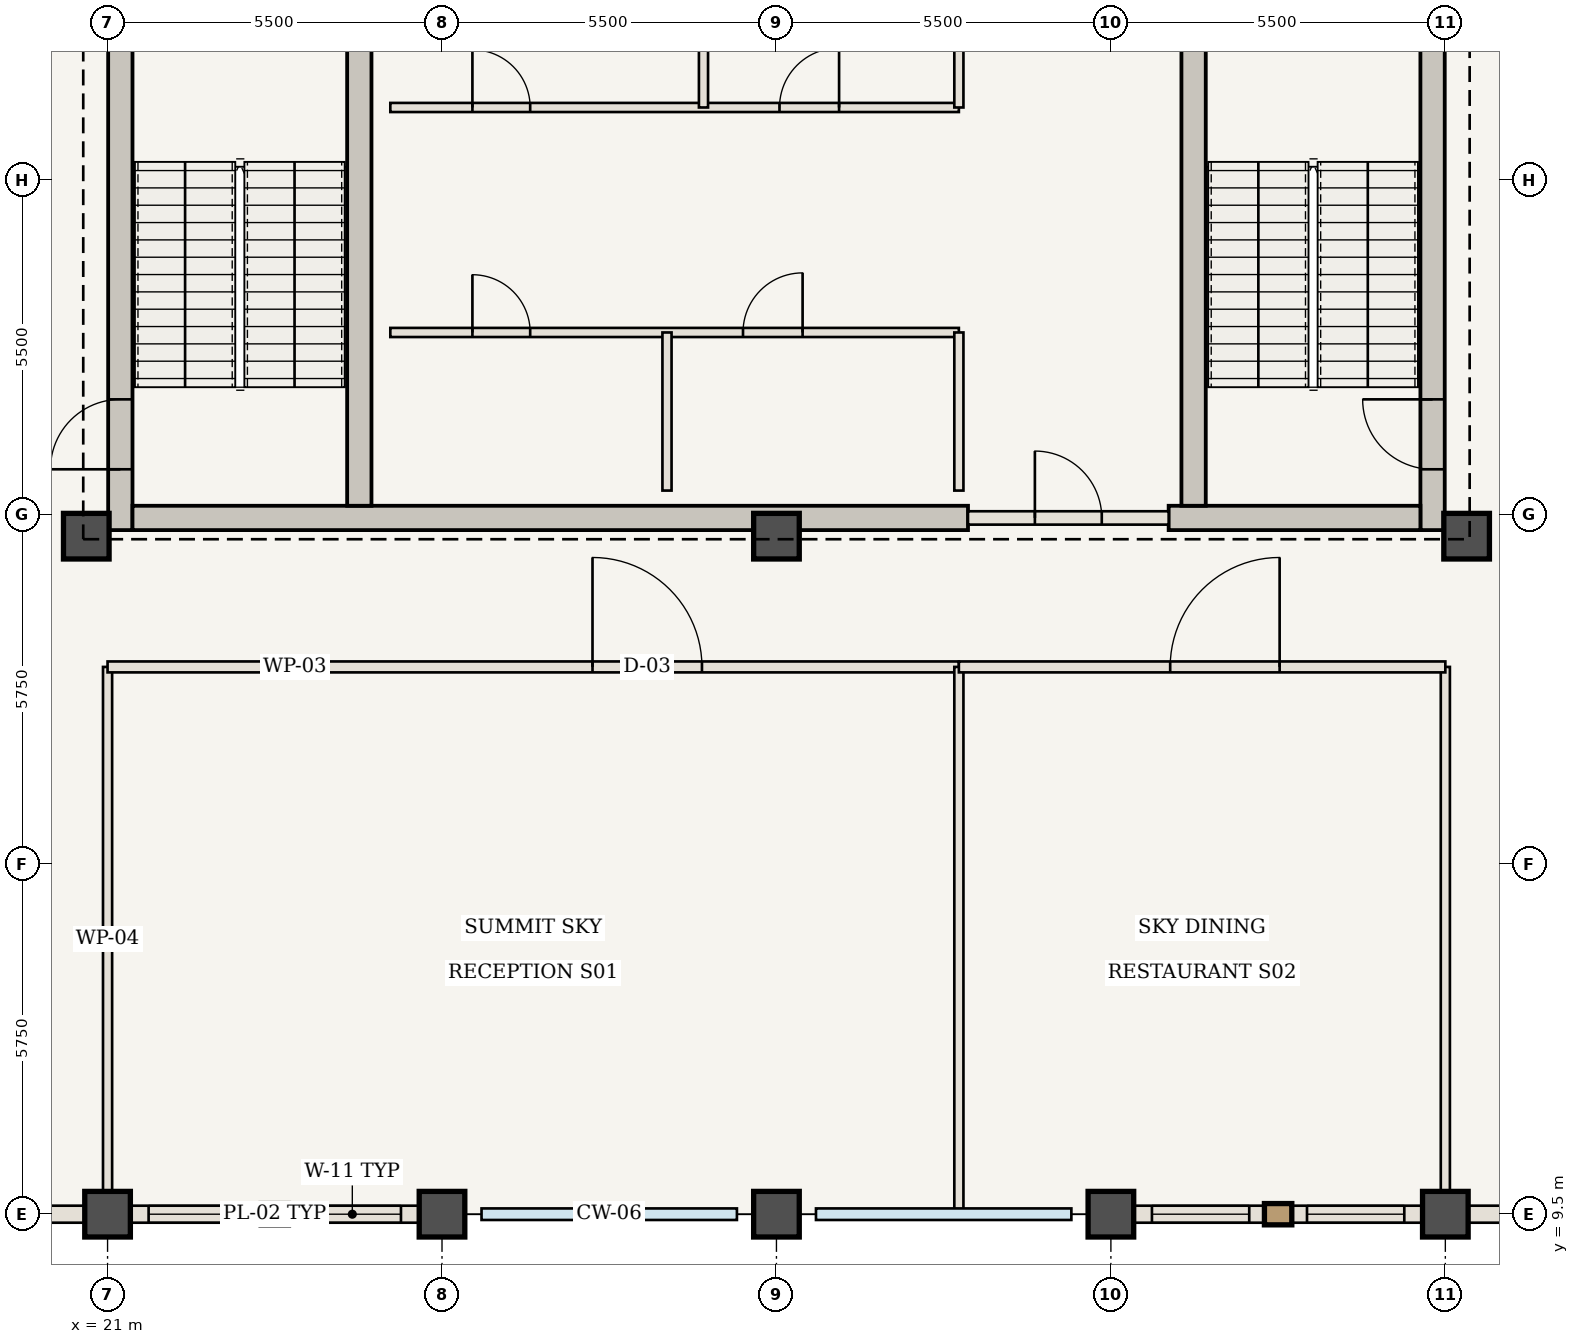
"""IFC4 building model, lengths in metres.
Left out: names, types, materials, properties, quantities, classifications, styles, units other than length and angle.
Written with IfcOpenShell. Run it as: python <this file> out.ifc"""

import sys

from ifc_helpers import new_model, si_unit, direction, frame, frame_2d, origin, origin_2d, place, context, subcontext, project, spatial, rectangle, extrude, element, fill, save


model = new_model("IFC4")
c1 = context("Model", 3, precision=1e-05, world=origin(), true_north=direction((0.0, 1.0)))
c2 = subcontext(c1, "Body", "Model", "MODEL_VIEW")
j1 = project(units=[si_unit("LENGTHUNIT", "METRE"), si_unit("PLANEANGLEUNIT", "RADIAN")], contexts=[c1])
p1 = place(None, origin())
s1 = spatial("IfcSite", under=j1, at=p1, CompositionType="ELEMENT")
p2 = place(p1, origin())
s2 = spatial("IfcBuilding", under=s1, at=p2, CompositionType="ELEMENT")
p3 = place(p2, frame((0.0, 0.0, 308.35)))
s3 = spatial("IfcBuildingStorey", under=s2, at=p3, CompositionType="ELEMENT", Elevation=308.35)
p4 = place(p3, frame((21.21, 20.75, 0.0), z_axis=(0.0, 0.0, 1.0), x_axis=(0.0, 1.0, 0.0)))
e1 = element("IfcWall", 1, at=p4, inside=s3, PredefinedType="SHEAR", context=c2, shape_type="SweptSolid", body=[
    extrude(rectangle(XDim=9.85, YDim=0.4, at=frame_2d((4.925, 0.0))), origin(), (0.0, 0.0, 1.0), 4.9),
])
p5 = place(p4, frame((1.0, 0.0, 0.0)))
e2 = element("IfcOpeningElement", 2, at=p5, cuts=e1, PredefinedType="OPENING", context=c2, shape_type="SweptSolid", body=[
    extrude(rectangle(XDim=1.15, YDim=2.15, at=frame_2d((0.575, 1.075))), frame((0.0, 0.21, 0.0), z_axis=(0.0, -1.0, 0.0), x_axis=(1.0, 0.0, 0.0)), (0.0, 0.0, 1.0), 0.42),
])
p6 = place(p3, frame((42.79, 20.75, 0.0), z_axis=(0.0, 0.0, 1.0), x_axis=(0.0, 1.0, 0.0)))
e3 = element("IfcWall", 3, at=p6, inside=s3, PredefinedType="SHEAR", context=c2, shape_type="SweptSolid", body=[
    extrude(rectangle(XDim=9.85, YDim=0.4, at=frame_2d((4.925, 0.0))), origin(), (0.0, 0.0, 1.0), 4.9),
])
p7 = place(p6, frame((1.0, 0.0, 0.0)))
e4 = element("IfcOpeningElement", 4, at=p7, cuts=e3, PredefinedType="OPENING", context=c2, shape_type="SweptSolid", body=[
    extrude(rectangle(XDim=1.15, YDim=2.15, at=frame_2d((0.575, 1.075))), frame((0.0, 0.21, 0.0), z_axis=(0.0, -1.0, 0.0), x_axis=(1.0, 0.0, 0.0)), (0.0, 0.0, 1.0), 0.42),
])
p8 = place(p3, frame((21.41, 20.95, 0.0), z_axis=(0.0, 0.0, 1.0), x_axis=(1.0, 0.0, 0.0)))
e5 = element("IfcWall", 5, at=p8, inside=s3, PredefinedType="SHEAR", context=c2, shape_type="SweptSolid", body=[
    extrude(rectangle(XDim=13.74, YDim=0.4, at=frame_2d((6.87, 0.0))), origin(), (0.0, 0.0, 1.0), 4.9),
])
p9 = place(p3, frame((38.45, 20.95, 0.0), z_axis=(0.0, 0.0, 1.0), x_axis=(1.0, 0.0, 0.0)))
e6 = element("IfcWall", 6, at=p9, inside=s3, PredefinedType="SHEAR", context=c2, shape_type="SweptSolid", body=[
    extrude(rectangle(XDim=4.14, YDim=0.4, at=frame_2d((2.07, 0.0))), origin(), (0.0, 0.0, 1.0), 4.9),
])
for number, where, z_axis, x_axis in (
    (7, (25.14, 21.15, 0.0), (0.0, 0.0, 1.0), (0.0, 1.0, 0.0)),
    (8, (38.86, 21.15, 0.0), (0.0, 0.0, 1.0), (0.0, 1.0, 0.0)),
):
    element("IfcWall", number, at=place(p3, frame(where, z_axis=z_axis, x_axis=x_axis)), inside=s3, PredefinedType="SHEAR", context=c2, shape_type="SweptSolid", body=[
        extrude(rectangle(XDim=9.45, YDim=0.4, at=frame_2d((4.725, 0.0))), origin(), (0.0, 0.0, 1.0), 4.9),
    ])
for number, where, z_axis, x_axis in (
    (9, (20.65, 20.65, 0.0), (0.0, 0.0, 1.0), (1.0, 0.0, 0.0)),
    (10, (32.0, 20.65, 0.0), (0.0, 0.0, 1.0), (1.0, 0.0, 0.0)),
    (11, (43.35, 20.65, 0.0), (0.0, 0.0, 1.0), (1.0, 0.0, 0.0)),
    (12, (21.0, 9.5, 0.0), (0.0, 0.0, 1.0), (1.0, 0.0, 0.0)),
    (13, (26.5, 9.5, 0.0), (0.0, 0.0, 1.0), (1.0, 0.0, 0.0)),
    (14, (32.0, 9.5, 0.0), (0.0, 0.0, 1.0), (1.0, 0.0, 0.0)),
    (15, (37.5, 9.5, 0.0), (0.0, 0.0, 1.0), (1.0, 0.0, 0.0)),
    (16, (43.0, 9.5, 0.0), (0.0, 0.0, 1.0), (1.0, 0.0, 0.0)),
):
    element("IfcColumn", number, at=place(p3, frame(where, z_axis=z_axis, x_axis=x_axis)), inside=s3, PredefinedType="COLUMN", context=c2, shape_type="SweptSolid", body=[
        extrude(rectangle(XDim=0.75, YDim=0.75, at=origin_2d()), origin(), (0.0, 0.0, 1.0), 4.9),
    ])
p10 = place(p3, frame((35.15, 20.95, 0.0), z_axis=(0.0, 0.0, 1.0), x_axis=(1.0, 0.0, 0.0)))
e17 = element("IfcWall", 17, at=p10, inside=s3, PredefinedType="STANDARD", context=c2, shape_type="SweptSolid", body=[
    extrude(rectangle(XDim=3.3, YDim=0.22, at=frame_2d((1.65, 0.0))), origin(), (0.0, 0.0, 1.0), 4.64),
])
p11 = place(p10, frame((1.1, 0.0, 0.0)))
e18 = element("IfcOpeningElement", 18, at=p11, cuts=e17, PredefinedType="OPENING", context=c2, shape_type="SweptSolid", body=[
    extrude(rectangle(XDim=1.1, YDim=2.15, at=frame_2d((0.55, 1.075))), frame((0.0, 0.12, 0.0), z_axis=(0.0, -1.0, 0.0), x_axis=(1.0, 0.0, 0.0)), (0.0, 0.0, 1.0), 0.24),
])
p12 = place(p3, frame((25.65, 24.0, 0.0), z_axis=(0.0, 0.0, 1.0), x_axis=(1.0, 0.0, 0.0)))
e19 = element("IfcWall", 19, at=p12, inside=s3, PredefinedType="STANDARD", context=c2, shape_type="SweptSolid", body=[
    extrude(rectangle(XDim=9.35, YDim=0.15, at=frame_2d((4.675, 0.0))), origin(), (0.0, 0.0, 1.0), 4.64),
])
p13 = place(p12, frame((1.35, 0.0, 0.0)))
e20 = element("IfcOpeningElement", 20, at=p13, cuts=e19, PredefinedType="OPENING", context=c2, shape_type="SweptSolid", body=[
    extrude(rectangle(XDim=0.95, YDim=2.15, at=frame_2d((0.475, 1.075))), frame((0.0, 0.085, 0.0), z_axis=(0.0, -1.0, 0.0), x_axis=(1.0, 0.0, 0.0)), (0.0, 0.0, 1.0), 0.17),
])
p14 = place(p12, frame((5.8, 0.0, 0.0)))
e21 = element("IfcOpeningElement", 21, at=p14, cuts=e19, PredefinedType="OPENING", context=c2, shape_type="SweptSolid", body=[
    extrude(rectangle(XDim=0.98, YDim=2.2, at=frame_2d((0.49, 1.1))), frame((0.0, 0.085, 0.0), z_axis=(0.0, -1.0, 0.0), x_axis=(1.0, 0.0, 0.0)), (0.0, 0.0, 1.0), 0.17),
])
for number, where, z_axis, x_axis in (
    (22, (30.2, 21.4, 0.0), (0.0, 0.0, 1.0), (0.0, 1.0, 0.0)),
    (23, (35.0, 21.4, 0.0), (0.0, 0.0, 1.0), (0.0, 1.0, 0.0)),
):
    element("IfcWall", number, at=place(p3, frame(where, z_axis=z_axis, x_axis=x_axis)), inside=s3, PredefinedType="STANDARD", context=c2, shape_type="SweptSolid", body=[
        extrude(rectangle(XDim=2.6, YDim=0.15, at=frame_2d((1.3, 0.0))), origin(), (0.0, 0.0, 1.0), 4.64),
    ])
p15 = place(p3, frame((25.65, 27.7, 0.0), z_axis=(0.0, 0.0, 1.0), x_axis=(1.0, 0.0, 0.0)))
e24 = element("IfcWall", 24, at=p15, inside=s3, PredefinedType="STANDARD", context=c2, shape_type="SweptSolid", body=[
    extrude(rectangle(XDim=9.35, YDim=0.15, at=frame_2d((4.675, 0.0))), origin(), (0.0, 0.0, 1.0), 4.64),
])
p16 = place(p15, frame((1.35, 0.0, 0.0)))
e25 = element("IfcOpeningElement", 25, at=p16, cuts=e24, PredefinedType="OPENING", context=c2, shape_type="SweptSolid", body=[
    extrude(rectangle(XDim=0.95, YDim=2.15, at=frame_2d((0.475, 1.075))), frame((0.0, 0.085, 0.0), z_axis=(0.0, -1.0, 0.0), x_axis=(1.0, 0.0, 0.0)), (0.0, 0.0, 1.0), 0.17),
])
p17 = place(p15, frame((6.4, 0.0, 0.0)))
e26 = element("IfcOpeningElement", 26, at=p17, cuts=e24, PredefinedType="OPENING", context=c2, shape_type="SweptSolid", body=[
    extrude(rectangle(XDim=0.98, YDim=2.2, at=frame_2d((0.49, 1.1))), frame((0.0, 0.085, 0.0), z_axis=(0.0, -1.0, 0.0), x_axis=(1.0, 0.0, 0.0)), (0.0, 0.0, 1.0), 0.17),
])
for number, where, z_axis, x_axis in (
    (27, (30.8, 27.7, 0.0), (0.0, 0.0, 1.0), (0.0, 1.0, 0.0)),
    (28, (35.0, 27.7, 0.0), (0.0, 0.0, 1.0), (0.0, 1.0, 0.0)),
):
    element("IfcWall", number, at=place(p3, frame(where, z_axis=z_axis, x_axis=x_axis)), inside=s3, PredefinedType="STANDARD", context=c2, shape_type="SweptSolid", body=[
        extrude(rectangle(XDim=2.75, YDim=0.15, at=frame_2d((1.375, 0.0))), origin(), (0.0, 0.0, 1.0), 4.64),
    ])
for number, where, z_axis, x_axis in (
    (29, (21.0, 9.56, 0.0), (0.0, 0.0, 1.0), (0.0, 1.0, 0.0)),
    (30, (43.0, 9.56, 0.0), (0.0, 0.0, 1.0), (0.0, 1.0, 0.0)),
):
    element("IfcWall", number, at=place(p3, frame(where, z_axis=z_axis, x_axis=x_axis)), inside=s3, PredefinedType="STANDARD", context=c2, shape_type="SweptSolid", body=[
        extrude(rectangle(XDim=8.94, YDim=0.15, at=frame_2d((4.47, 0.0))), origin(), (0.0, 0.0, 1.0), 4.64),
    ])
p18 = place(p3, frame((21.0, 18.5, 0.0), z_axis=(0.0, 0.0, 1.0), x_axis=(1.0, 0.0, 0.0)))
e31 = element("IfcWall", 31, at=p18, inside=s3, PredefinedType="STANDARD", context=c2, shape_type="SweptSolid", body=[
    extrude(rectangle(XDim=14.0, YDim=0.18, at=frame_2d((7.0, 0.0))), origin(), (0.0, 0.0, 1.0), 4.64),
])
p19 = place(p18, frame((7.975, 0.0, 0.0)))
e32 = element("IfcOpeningElement", 32, at=p19, cuts=e31, PredefinedType="OPENING", context=c2, shape_type="SweptSolid", body=[
    extrude(rectangle(XDim=1.8, YDim=2.35, at=frame_2d((0.9, 1.175))), frame((0.0, 0.1, 0.0), z_axis=(0.0, -1.0, 0.0), x_axis=(1.0, 0.0, 0.0)), (0.0, 0.0, 1.0), 0.2),
])
p20 = place(p3, frame((35.0, 9.56, 0.0), z_axis=(0.0, 0.0, 1.0), x_axis=(0.0, 1.0, 0.0)))
e33 = element("IfcWall", 33, at=p20, inside=s3, PredefinedType="STANDARD", context=c2, shape_type="SweptSolid", body=[
    extrude(rectangle(XDim=8.94, YDim=0.15, at=frame_2d((4.47, 0.0))), origin(), (0.0, 0.0, 1.0), 4.64),
])
p21 = place(p3, frame((35.0, 18.5, 0.0), z_axis=(0.0, 0.0, 1.0), x_axis=(1.0, 0.0, 0.0)))
e34 = element("IfcWall", 34, at=p21, inside=s3, PredefinedType="STANDARD", context=c2, shape_type="SweptSolid", body=[
    extrude(rectangle(XDim=8.0, YDim=0.18, at=frame_2d((4.0, 0.0))), origin(), (0.0, 0.0, 1.0), 4.64),
])
p22 = place(p21, frame((3.475, 0.0, 0.0)))
e35 = element("IfcOpeningElement", 35, at=p22, cuts=e34, PredefinedType="OPENING", context=c2, shape_type="SweptSolid", body=[
    extrude(rectangle(XDim=1.8, YDim=2.35, at=frame_2d((0.9, 1.175))), frame((0.0, 0.1, 0.0), z_axis=(0.0, -1.0, 0.0), x_axis=(1.0, 0.0, 0.0)), (0.0, 0.0, 1.0), 0.2),
])
p23 = place(p3, frame((21.0, 9.5, 0.0), z_axis=(0.0, 0.0, 1.0), x_axis=(-1.0, 0.0, 0.0)))
e36 = element("IfcWall", 36, at=p23, inside=s3, PredefinedType="USERDEFINED", context=c2, shape_type="SweptSolid", body=[
    extrude(rectangle(XDim=5.5, YDim=0.28, at=frame_2d((2.75, 0.0))), origin(), (0.0, 0.0, 1.0), 3.94),
])
p24 = place(p3, frame((26.5, 9.5, 0.0), z_axis=(0.0, 0.0, 1.0), x_axis=(-1.0, 0.0, 0.0)))
e37 = element("IfcWall", 37, at=p24, inside=s3, PredefinedType="USERDEFINED", context=c2, shape_type="SweptSolid", body=[
    extrude(rectangle(XDim=5.5, YDim=0.28, at=frame_2d((2.75, 0.0))), origin(), (0.0, 0.0, 1.0), 3.94),
])
p25 = place(p24, frame((0.675, 0.0, 0.85)))
e38 = element("IfcOpeningElement", 38, at=p25, cuts=e37, PredefinedType="OPENING", context=c2, shape_type="SweptSolid", body=[
    extrude(rectangle(XDim=1.6, YDim=2.15, at=frame_2d((0.8, 1.075))), frame((0.0, 0.15, 0.0), z_axis=(0.0, -1.0, 0.0), x_axis=(1.0, 0.0, 0.0)), (0.0, 0.0, 1.0), 0.3),
])
p26 = place(p24, frame((3.225, 0.0, 0.85)))
e39 = element("IfcOpeningElement", 39, at=p26, cuts=e37, PredefinedType="OPENING", context=c2, shape_type="SweptSolid", body=[
    extrude(rectangle(XDim=1.6, YDim=2.15, at=frame_2d((0.8, 1.075))), frame((0.0, 0.15, 0.0), z_axis=(0.0, -1.0, 0.0), x_axis=(1.0, 0.0, 0.0)), (0.0, 0.0, 1.0), 0.3),
])
p27 = place(p3, frame((43.0, 9.5, 0.0), z_axis=(0.0, 0.0, 1.0), x_axis=(-1.0, 0.0, 0.0)))
e40 = element("IfcWall", 40, at=p27, inside=s3, PredefinedType="USERDEFINED", context=c2, shape_type="SweptSolid", body=[
    extrude(rectangle(XDim=5.5, YDim=0.28, at=frame_2d((2.75, 0.0))), origin(), (0.0, 0.0, 1.0), 3.94),
])
p28 = place(p27, frame((0.675, 0.0, 0.85)))
e41 = element("IfcOpeningElement", 41, at=p28, cuts=e40, PredefinedType="OPENING", context=c2, shape_type="SweptSolid", body=[
    extrude(rectangle(XDim=1.6, YDim=2.15, at=frame_2d((0.8, 1.075))), frame((0.0, 0.15, 0.0), z_axis=(0.0, -1.0, 0.0), x_axis=(1.0, 0.0, 0.0)), (0.0, 0.0, 1.0), 0.3),
])
p29 = place(p27, frame((3.225, 0.0, 0.85)))
e42 = element("IfcOpeningElement", 42, at=p29, cuts=e40, PredefinedType="OPENING", context=c2, shape_type="SweptSolid", body=[
    extrude(rectangle(XDim=1.6, YDim=2.15, at=frame_2d((0.8, 1.075))), frame((0.0, 0.15, 0.0), z_axis=(0.0, -1.0, 0.0), x_axis=(1.0, 0.0, 0.0)), (0.0, 0.0, 1.0), 0.3),
])
p30 = place(p3, frame((48.5, 9.5, 0.0), z_axis=(0.0, 0.0, 1.0), x_axis=(-1.0, 0.0, 0.0)))
e43 = element("IfcWall", 43, at=p30, inside=s3, PredefinedType="USERDEFINED", context=c2, shape_type="SweptSolid", body=[
    extrude(rectangle(XDim=5.5, YDim=0.28, at=frame_2d((2.75, 0.0))), origin(), (0.0, 0.0, 1.0), 3.94),
])
p31 = place(p5, origin())
e44 = element("IfcDoor", 44, at=p31, inside=s3, OperationType="SINGLE_SWING_LEFT", PredefinedType="DOOR", context=c2, shape_type="SweptSolid", body=[
    extrude(rectangle(XDim=1.15, YDim=2.15, at=frame_2d((0.575, 1.075))), frame((0.0, 0.025, 0.0), z_axis=(0.0, -1.0, 0.0), x_axis=(1.0, 0.0, 0.0)), (0.0, 0.0, 1.0), 0.05),
])
fill(e2, e44)
p32 = place(p7, origin())
e45 = element("IfcDoor", 45, at=p32, inside=s3, OperationType="SINGLE_SWING_RIGHT", PredefinedType="DOOR", context=c2, shape_type="SweptSolid", body=[
    extrude(rectangle(XDim=1.15, YDim=2.15, at=frame_2d((0.575, 1.075))), frame((0.0, 0.025, 0.0), z_axis=(0.0, -1.0, 0.0), x_axis=(1.0, 0.0, 0.0)), (0.0, 0.0, 1.0), 0.05),
])
fill(e4, e45)
p33 = place(p11, origin())
e46 = element("IfcDoor", 46, at=p33, inside=s3, OperationType="SINGLE_SWING_LEFT", PredefinedType="DOOR", context=c2, shape_type="SweptSolid", body=[
    extrude(rectangle(XDim=1.1, YDim=2.15, at=frame_2d((0.55, 1.075))), frame((0.0, 0.025, 0.0), z_axis=(0.0, -1.0, 0.0), x_axis=(1.0, 0.0, 0.0)), (0.0, 0.0, 1.0), 0.05),
])
fill(e18, e46)
p34 = place(p13, origin())
e47 = element("IfcDoor", 47, at=p34, inside=s3, OperationType="SINGLE_SWING_LEFT", PredefinedType="DOOR", context=c2, shape_type="SweptSolid", body=[
    extrude(rectangle(XDim=0.95, YDim=2.15, at=frame_2d((0.475, 1.075))), frame((0.0, 0.025, 0.0), z_axis=(0.0, -1.0, 0.0), x_axis=(1.0, 0.0, 0.0)), (0.0, 0.0, 1.0), 0.05),
])
fill(e20, e47)
p35 = place(p14, origin())
e48 = element("IfcDoor", 48, at=p35, inside=s3, OperationType="SINGLE_SWING_RIGHT", PredefinedType="DOOR", context=c2, shape_type="SweptSolid", body=[
    extrude(rectangle(XDim=0.98, YDim=2.2, at=frame_2d((0.49, 1.1))), frame((0.0, 0.025, 0.0), z_axis=(0.0, -1.0, 0.0), x_axis=(1.0, 0.0, 0.0)), (0.0, 0.0, 1.0), 0.05),
])
fill(e21, e48)
p36 = place(p16, origin())
e49 = element("IfcDoor", 49, at=p36, inside=s3, OperationType="SINGLE_SWING_LEFT", PredefinedType="DOOR", context=c2, shape_type="SweptSolid", body=[
    extrude(rectangle(XDim=0.95, YDim=2.15, at=frame_2d((0.475, 1.075))), frame((0.0, 0.025, 0.0), z_axis=(0.0, -1.0, 0.0), x_axis=(1.0, 0.0, 0.0)), (0.0, 0.0, 1.0), 0.05),
])
fill(e25, e49)
p37 = place(p17, origin())
e50 = element("IfcDoor", 50, at=p37, inside=s3, OperationType="SINGLE_SWING_RIGHT", PredefinedType="DOOR", context=c2, shape_type="SweptSolid", body=[
    extrude(rectangle(XDim=0.98, YDim=2.2, at=frame_2d((0.49, 1.1))), frame((0.0, 0.025, 0.0), z_axis=(0.0, -1.0, 0.0), x_axis=(1.0, 0.0, 0.0)), (0.0, 0.0, 1.0), 0.05),
])
fill(e26, e50)
p38 = place(p19, origin())
e51 = element("IfcDoor", 51, at=p38, inside=s3, OperationType="SINGLE_SWING_LEFT", PredefinedType="DOOR", context=c2, shape_type="SweptSolid", body=[
    extrude(rectangle(XDim=1.8, YDim=2.35, at=frame_2d((0.9, 1.175))), frame((0.0, 0.025, 0.0), z_axis=(0.0, -1.0, 0.0), x_axis=(1.0, 0.0, 0.0)), (0.0, 0.0, 1.0), 0.05),
])
fill(e32, e51)
p39 = place(p22, origin())
e52 = element("IfcDoor", 52, at=p39, inside=s3, OperationType="SINGLE_SWING_RIGHT", PredefinedType="DOOR", context=c2, shape_type="SweptSolid", body=[
    extrude(rectangle(XDim=1.8, YDim=2.35, at=frame_2d((0.9, 1.175))), frame((0.0, 0.025, 0.0), z_axis=(0.0, -1.0, 0.0), x_axis=(1.0, 0.0, 0.0)), (0.0, 0.0, 1.0), 0.05),
])
fill(e35, e52)
p40 = place(p25, origin())
e53 = element("IfcWindow", 53, at=p40, inside=s3, PartitioningType="SINGLE_PANEL", PredefinedType="WINDOW", context=c2, shape_type="SweptSolid", body=[
    extrude(rectangle(XDim=1.6, YDim=2.15, at=frame_2d((0.8, 1.075))), frame((0.0, 0.03, 0.0), z_axis=(0.0, -1.0, 0.0), x_axis=(1.0, 0.0, 0.0)), (0.0, 0.0, 1.0), 0.06),
])
fill(e38, e53)
p41 = place(p26, origin())
e54 = element("IfcWindow", 54, at=p41, inside=s3, PartitioningType="SINGLE_PANEL", PredefinedType="WINDOW", context=c2, shape_type="SweptSolid", body=[
    extrude(rectangle(XDim=1.6, YDim=2.15, at=frame_2d((0.8, 1.075))), frame((0.0, 0.03, 0.0), z_axis=(0.0, -1.0, 0.0), x_axis=(1.0, 0.0, 0.0)), (0.0, 0.0, 1.0), 0.06),
])
fill(e39, e54)
p42 = place(p28, origin())
e55 = element("IfcWindow", 55, at=p42, inside=s3, PartitioningType="SINGLE_PANEL", PredefinedType="WINDOW", context=c2, shape_type="SweptSolid", body=[
    extrude(rectangle(XDim=1.6, YDim=2.15, at=frame_2d((0.8, 1.075))), frame((0.0, 0.03, 0.0), z_axis=(0.0, -1.0, 0.0), x_axis=(1.0, 0.0, 0.0)), (0.0, 0.0, 1.0), 0.06),
])
fill(e41, e55)
p43 = place(p29, origin())
e56 = element("IfcWindow", 56, at=p43, inside=s3, PartitioningType="SINGLE_PANEL", PredefinedType="WINDOW", context=c2, shape_type="SweptSolid", body=[
    extrude(rectangle(XDim=1.6, YDim=2.15, at=frame_2d((0.8, 1.075))), frame((0.0, 0.03, 0.0), z_axis=(0.0, -1.0, 0.0), x_axis=(1.0, 0.0, 0.0)), (0.0, 0.0, 1.0), 0.06),
])
fill(e42, e56)
save(model, sys.argv[1])
